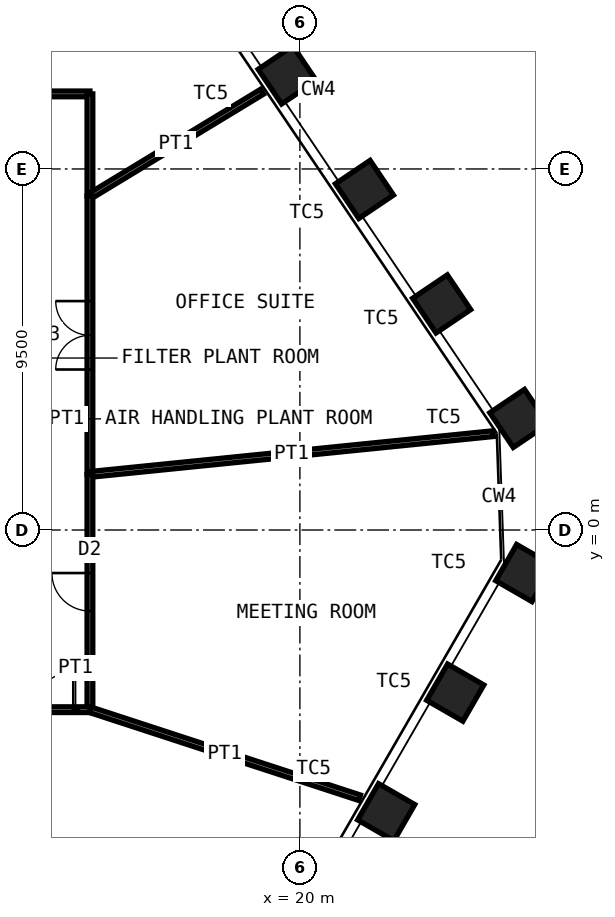
"""IFC4 building model, lengths in metres.
Left out: names, types, materials, properties, quantities, classifications, styles, units other than length and angle.
Written with IfcOpenShell. Run it as: python <this file> out.ifc"""

import sys

from ifc_helpers import new_model, si_unit, direction, frame, frame_2d, origin, origin_2d, place, context, subcontext, project, spatial, rectangle, hollow_rectangle, extrude, element, fill, save


model = new_model("IFC4")
c1 = context("Model", 3, precision=1e-05, world=origin(), true_north=direction((0.0, 1.0)))
c2 = subcontext(c1, "Body", "Model", "MODEL_VIEW")
j1 = project(units=[si_unit("LENGTHUNIT", "METRE"), si_unit("PLANEANGLEUNIT", "RADIAN")], contexts=[c1])
p1 = place(None, origin())
s1 = spatial("IfcSite", under=j1, at=p1, CompositionType="ELEMENT")
p2 = place(p1, origin())
s2 = spatial("IfcBuilding", under=s1, at=p2, CompositionType="ELEMENT")
p3 = place(p2, frame((0.0, 0.0, 201.4)))
s3 = spatial("IfcBuildingStorey", under=s2, at=p3, CompositionType="ELEMENT", Elevation=201.4)
for number, where, z_axis, x_axis in (
    (1, (19.667, 11.973, 0.0), (0.0, 0.0, 1.0), (-0.559, 0.829, 0.0)),
    (2, (21.699, 8.961, 0.0), (0.0, 0.0, 1.0), (-0.559, 0.829, 0.0)),
    (3, (23.731, 5.948, 0.0), (0.0, 0.0, 1.0), (-0.559, 0.829, 0.0)),
    (4, (25.762, 2.936, 0.0), (0.0, 0.0, 1.0), (-0.559, 0.829, 0.0)),
    (5, (25.905, -1.132, 0.0), (0.0, 0.0, 1.0), (0.5, 0.866, 0.0)),
    (6, (24.088, -4.279, 0.0), (0.0, 0.0, 1.0), (0.5, 0.866, 0.0)),
    (7, (22.271, -7.426, 0.0), (0.0, 0.0, 1.0), (0.5, 0.866, 0.0)),
):
    element("IfcColumn", number, at=place(p3, frame(where, z_axis=z_axis, x_axis=x_axis)), inside=s3, PredefinedType="COLUMN", context=c2, shape_type="SweptSolid", body=[
        extrude(hollow_rectangle(XDim=1.1, YDim=1.1, WallThickness=0.07, at=origin_2d()), origin(), (0.0, 0.0, 1.0), 4.2),
    ])
p4 = place(p3, frame((5.058, 11.475, 0.0), z_axis=(0.0, 0.0, 1.0), x_axis=(1.0, 0.0, 0.0)))
e8 = element("IfcWall", 8, at=p4, inside=s3, PredefinedType="PARTITIONING", context=c2, shape_type="SweptSolid", body=[
    extrude(rectangle(XDim=9.417, YDim=0.15, at=frame_2d((4.708, 0.0))), origin(), (0.0, 0.0, 1.0), 4.03),
])
p5 = place(p4, frame((3.809, 0.0, 0.0)))
e9 = element("IfcOpeningElement", 9, at=p5, cuts=e8, PredefinedType="OPENING", context=c2, shape_type="SweptSolid", body=[
    extrude(rectangle(XDim=1.8, YDim=2.4, at=frame_2d((0.9, 1.2))), frame((0.0, 0.085, 0.0), z_axis=(0.0, -1.0, 0.0), x_axis=(1.0, 0.0, 0.0)), (0.0, 0.0, 1.0), 0.17),
])
p6 = place(p3, frame((14.475, 11.475, 0.0), z_axis=(0.0, 0.0, 1.0), x_axis=(0.0, -1.0, 0.0)))
e10 = element("IfcWall", 10, at=p6, inside=s3, PredefinedType="PARTITIONING", context=c2, shape_type="SweptSolid", body=[
    extrude(rectangle(XDim=2.692, YDim=0.15, at=frame_2d((1.346, 0.0))), origin(), (0.0, 0.0, 1.0), 4.03),
])
p7 = place(p3, frame((19.001, 11.53, 0.0), z_axis=(0.0, 0.0, 1.0), x_axis=(-0.854906581035, -0.518781975114, 0.0)))
e11 = element("IfcWall", 11, at=p7, inside=s3, PredefinedType="PARTITIONING", context=c2, shape_type="SweptSolid", body=[
    extrude(rectangle(XDim=5.294, YDim=0.15, at=frame_2d((2.647, 0.0))), origin(), (0.0, 0.0, 1.0), 3.43),
])
p8 = place(p3, frame((14.475, 8.783, 0.0), z_axis=(0.0, 0.0, 1.0), x_axis=(0.0, -1.0, 0.0)))
e12 = element("IfcWall", 12, at=p8, inside=s3, PredefinedType="PARTITIONING", context=c2, shape_type="SweptSolid", body=[
    extrude(rectangle(XDim=7.321, YDim=0.15, at=frame_2d((3.66, 0.0))), origin(), (0.0, 0.0, 1.0), 4.03),
])
p9 = place(p8, frame((2.76, 0.0, 0.0)))
e13 = element("IfcOpeningElement", 13, at=p9, cuts=e12, PredefinedType="OPENING", context=c2, shape_type="SweptSolid", body=[
    extrude(rectangle(XDim=1.8, YDim=2.4, at=frame_2d((0.9, 1.2))), frame((0.0, 0.085, 0.0), z_axis=(0.0, -1.0, 0.0), x_axis=(1.0, 0.0, 0.0)), (0.0, 0.0, 1.0), 0.17),
])
p10 = place(p3, frame((25.083, 2.535, 0.0), z_axis=(0.0, 0.0, 1.0), x_axis=(-0.994932122767, -0.10054884925, 0.0)))
e14 = element("IfcWall", 14, at=p10, inside=s3, PredefinedType="PARTITIONING", context=c2, shape_type="SweptSolid", body=[
    extrude(rectangle(XDim=10.662, YDim=0.15, at=frame_2d((5.331, 0.0))), origin(), (0.0, 0.0, 1.0), 2.93),
])
p11 = place(p3, frame((14.475, 1.463, 0.0), z_axis=(0.0, 0.0, 1.0), x_axis=(0.0, -1.0, 0.0)))
e15 = element("IfcWall", 15, at=p11, inside=s3, PredefinedType="PARTITIONING", context=c2, shape_type="SweptSolid", body=[
    extrude(rectangle(XDim=6.19, YDim=0.15, at=frame_2d((3.095, 0.0))), origin(), (0.0, 0.0, 1.0), 4.03),
])
p12 = place(p11, frame((2.595, 0.0, 0.0)))
e16 = element("IfcOpeningElement", 16, at=p12, cuts=e15, PredefinedType="OPENING", context=c2, shape_type="SweptSolid", body=[
    extrude(rectangle(XDim=1.0, YDim=2.4, at=frame_2d((0.5, 1.2))), frame((0.0, 0.085, 0.0), z_axis=(0.0, -1.0, 0.0), x_axis=(1.0, 0.0, 0.0)), (0.0, 0.0, 1.0), 0.17),
])
p13 = place(p3, frame((21.57, -7.044, 0.0), z_axis=(0.0, 0.0, 1.0), x_axis=(-0.950585953502, 0.310461503258, 0.0)))
e17 = element("IfcWall", 17, at=p13, inside=s3, PredefinedType="PARTITIONING", context=c2, shape_type="SweptSolid", body=[
    extrude(rectangle(XDim=7.464, YDim=0.15, at=frame_2d((3.732, 0.0))), origin(), (0.0, 0.0, 1.0), 3.43),
])
p14 = place(p3, frame((14.475, -4.727, 0.0), z_axis=(0.0, 0.0, 1.0), x_axis=(-1.0, 0.0, 0.0)))
e18 = element("IfcWall", 18, at=p14, inside=s3, PredefinedType="PARTITIONING", context=c2, shape_type="SweptSolid", body=[
    extrude(rectangle(XDim=1.875, YDim=0.15, at=frame_2d((0.938, 0.0))), origin(), (0.0, 0.0, 1.0), 4.03),
])
p15 = place(p14, frame((0.438, 0.0, 0.0)))
e19 = element("IfcOpeningElement", 19, at=p15, cuts=e18, PredefinedType="OPENING", context=c2, shape_type="SweptSolid", body=[
    extrude(rectangle(XDim=1.0, YDim=2.4, at=frame_2d((0.5, 1.2))), frame((0.0, 0.085, 0.0), z_axis=(0.0, -1.0, 0.0), x_axis=(1.0, 0.0, 0.0)), (0.0, 0.0, 1.0), 0.17),
])
p16 = place(p9, origin())
e20 = element("IfcDoor", 20, at=p16, inside=s3, OperationType="DOUBLE_DOOR_DOUBLE_SWING", PredefinedType="DOOR", context=c2, shape_type="SweptSolid", body=[
    extrude(rectangle(XDim=1.8, YDim=2.4, at=frame_2d((0.9, 1.2))), frame((0.0, 0.025, 0.0), z_axis=(0.0, -1.0, 0.0), x_axis=(1.0, 0.0, 0.0)), (0.0, 0.0, 1.0), 0.05),
])
fill(e13, e20)
p17 = place(p12, origin())
e21 = element("IfcDoor", 21, at=p17, inside=s3, OperationType="SINGLE_SWING_LEFT", PredefinedType="DOOR", context=c2, shape_type="SweptSolid", body=[
    extrude(rectangle(XDim=1.0, YDim=2.4, at=frame_2d((0.5, 1.2))), frame((0.0, 0.025, 0.0), z_axis=(0.0, -1.0, 0.0), x_axis=(1.0, 0.0, 0.0)), (0.0, 0.0, 1.0), 0.05),
])
fill(e16, e21)
p18 = place(p15, origin())
e22 = element("IfcDoor", 22, at=p18, inside=s3, OperationType="SINGLE_SWING_LEFT", PredefinedType="DOOR", context=c2, shape_type="SweptSolid", body=[
    extrude(rectangle(XDim=1.0, YDim=2.4, at=frame_2d((0.5, 1.2))), frame((0.0, 0.025, 0.0), z_axis=(0.0, -1.0, 0.0), x_axis=(1.0, 0.0, 0.0)), (0.0, 0.0, 1.0), 0.05),
])
fill(e19, e22)
save(model, sys.argv[1])
